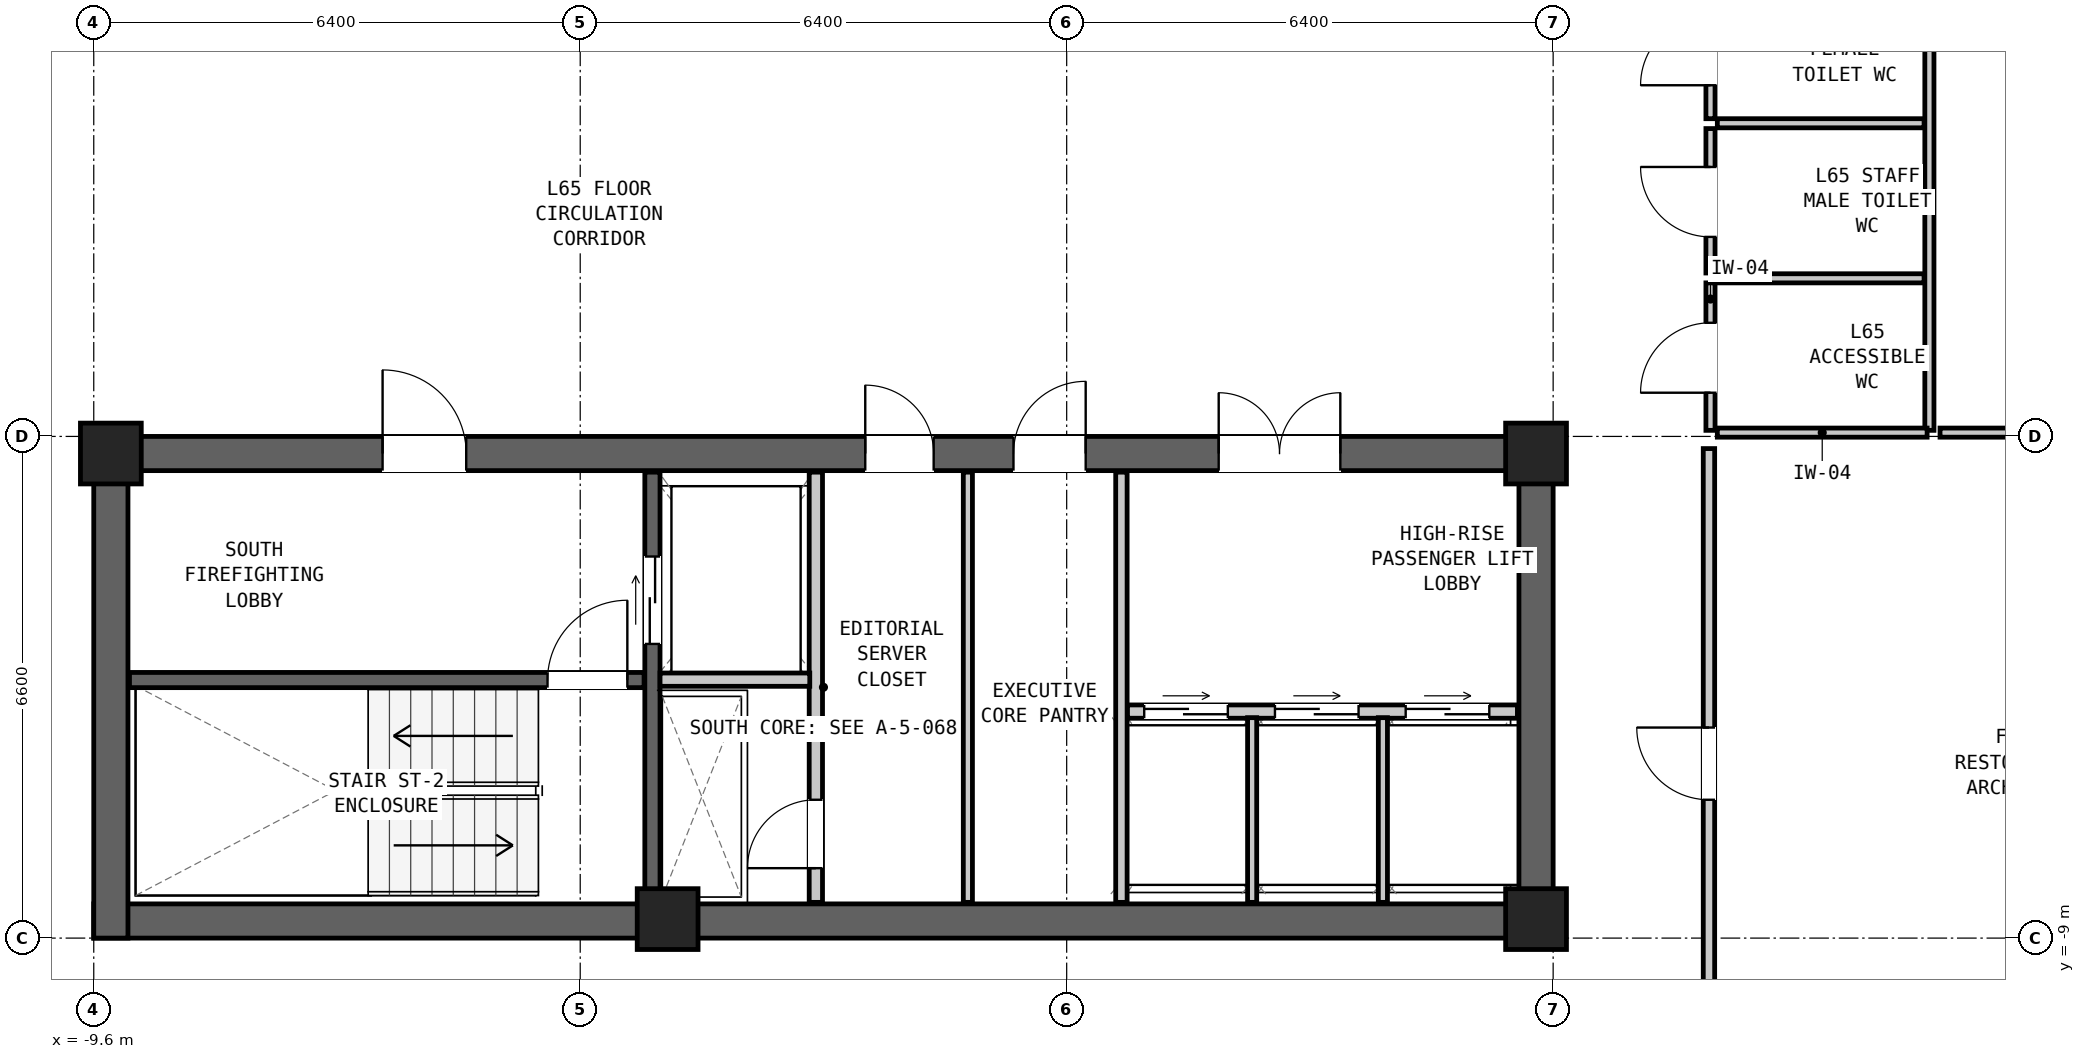
"""IFC4 building model, lengths in metres.
Left out: names, types, materials, properties, quantities, classifications, styles, units other than length and angle.
Written with IfcOpenShell. Run it as: python <this file> out.ifc"""

import sys

from ifc_helpers import new_model, si_unit, direction, frame, frame_2d, origin, origin_2d, place, context, subcontext, project, spatial, rectangle, extrude, element, fill, save


model = new_model("IFC4")
c1 = context("Model", 3, precision=1e-05, world=origin(), true_north=direction((0.0, 1.0)))
c2 = subcontext(c1, "Body", "Model", "MODEL_VIEW")
j1 = project(units=[si_unit("LENGTHUNIT", "METRE"), si_unit("PLANEANGLEUNIT", "RADIAN")], contexts=[c1])
p1 = place(None, origin())
s1 = spatial("IfcSite", under=j1, at=p1, CompositionType="ELEMENT")
p2 = place(p1, origin())
s2 = spatial("IfcBuilding", under=s1, at=p2, CompositionType="ELEMENT")
p3 = place(p2, frame((0.0, 0.0, 220.85)))
s3 = spatial("IfcBuildingStorey", under=s2, at=p3, CompositionType="ELEMENT", Elevation=220.85)
p4 = place(p3, frame((-9.6, -8.775, 0.0), z_axis=(0.0, 0.0, 1.0), x_axis=(1.0, 0.0, 0.0)))
e1 = element("IfcWall", 1, at=p4, inside=s3, PredefinedType="SHEAR", context=c2, shape_type="SweptSolid", body=[
    extrude(rectangle(XDim=19.2, YDim=0.45, at=frame_2d((9.6, 0.0))), origin(), (0.0, 0.0, 1.0), 3.05),
])
p5 = place(p3, frame((-9.6, -2.625, 0.0), z_axis=(0.0, 0.0, 1.0), x_axis=(1.0, 0.0, 0.0)))
e2 = element("IfcWall", 2, at=p5, inside=s3, PredefinedType="SHEAR", context=c2, shape_type="SweptSolid", body=[
    extrude(rectangle(XDim=19.2, YDim=0.45, at=frame_2d((9.6, 0.0))), origin(), (0.0, 0.0, 1.0), 3.05),
])
p6 = place(p5, frame((3.8, 0.0, 0.0)))
e3 = element("IfcOpeningElement", 3, at=p6, cuts=e2, PredefinedType="OPENING", context=c2, shape_type="SweptSolid", body=[
    extrude(rectangle(XDim=1.1, YDim=2.08, at=frame_2d((0.55, 1.04))), frame((0.0, 0.237, 0.0), z_axis=(0.0, -1.0, 0.0), x_axis=(1.0, 0.0, 0.0)), (0.0, 0.0, 1.0), 0.474),
])
p7 = place(p5, frame((10.15, 0.0, 0.0)))
e4 = element("IfcOpeningElement", 4, at=p7, cuts=e2, PredefinedType="OPENING", context=c2, shape_type="SweptSolid", body=[
    extrude(rectangle(XDim=0.9, YDim=2.05, at=frame_2d((0.45, 1.025))), frame((0.0, 0.237, 0.0), z_axis=(0.0, -1.0, 0.0), x_axis=(1.0, 0.0, 0.0)), (0.0, 0.0, 1.0), 0.474),
])
p8 = place(p5, frame((12.1, 0.0, 0.0)))
e5 = element("IfcOpeningElement", 5, at=p8, cuts=e2, PredefinedType="OPENING", context=c2, shape_type="SweptSolid", body=[
    extrude(rectangle(XDim=0.95, YDim=2.1, at=frame_2d((0.475, 1.05))), frame((0.0, 0.237, 0.0), z_axis=(0.0, -1.0, 0.0), x_axis=(1.0, 0.0, 0.0)), (0.0, 0.0, 1.0), 0.474),
])
p9 = place(p5, frame((14.8, 0.0, 0.0)))
e6 = element("IfcOpeningElement", 6, at=p9, cuts=e2, PredefinedType="OPENING", context=c2, shape_type="SweptSolid", body=[
    extrude(rectangle(XDim=1.6, YDim=2.12, at=frame_2d((0.8, 1.06))), frame((0.0, 0.237, 0.0), z_axis=(0.0, -1.0, 0.0), x_axis=(1.0, 0.0, 0.0)), (0.0, 0.0, 1.0), 0.474),
])
for number, where, z_axis, x_axis in (
    (7, (-9.375, -9.0, 0.0), (0.0, 0.0, 1.0), (0.0, 1.0, 0.0)),
    (8, (9.375, -9.0, 0.0), (0.0, 0.0, 1.0), (0.0, 1.0, 0.0)),
):
    element("IfcWall", number, at=place(p3, frame(where, z_axis=z_axis, x_axis=x_axis)), inside=s3, PredefinedType="SHEAR", context=c2, shape_type="SweptSolid", body=[
        extrude(rectangle(XDim=6.6, YDim=0.45, at=frame_2d((3.3, 0.0))), origin(), (0.0, 0.0, 1.0), 3.05),
    ])
for number, where, z_axis, x_axis in (
    (9, (-9.375, -2.625, 0.0), (0.0, 0.0, 1.0), (1.0, 0.0, 0.0)),
    (10, (9.375, -2.625, 0.0), (0.0, 0.0, 1.0), (1.0, 0.0, 0.0)),
    (11, (-2.05, -8.75, 0.0), (0.0, 0.0, 1.0), (1.0, 0.0, 0.0)),
    (12, (9.375, -8.75, 0.0), (0.0, 0.0, 1.0), (1.0, 0.0, 0.0)),
):
    element("IfcColumn", number, at=place(p3, frame(where, z_axis=z_axis, x_axis=x_axis)), inside=s3, PredefinedType="COLUMN", context=c2, shape_type="SweptSolid", body=[
        extrude(rectangle(XDim=0.8, YDim=0.8, at=origin_2d()), origin(), (0.0, 0.0, 1.0), 3.05),
    ])
p10 = place(p3, frame((-9.13, -5.605, 0.0), z_axis=(0.0, 0.0, 1.0), x_axis=(1.0, 0.0, 0.0)))
e13 = element("IfcWall", 13, at=p10, inside=s3, PredefinedType="SHEAR", context=c2, shape_type="SweptSolid", body=[
    extrude(rectangle(XDim=6.77, YDim=0.2, at=frame_2d((3.385, 0.0))), origin(), (0.0, 0.0, 1.0), 2.86),
])
p11 = place(p10, frame((5.5, 0.0, 0.0)))
e14 = element("IfcOpeningElement", 14, at=p11, cuts=e13, PredefinedType="OPENING", context=c2, shape_type="SweptSolid", body=[
    extrude(rectangle(XDim=1.05, YDim=2.08, at=frame_2d((0.525, 1.04))), frame((0.0, 0.112, 0.0), z_axis=(0.0, -1.0, 0.0), x_axis=(1.0, 0.0, 0.0)), (0.0, 0.0, 1.0), 0.224),
])
p12 = place(p3, frame((-2.25, -8.53, 0.0), z_axis=(0.0, 0.0, 1.0), x_axis=(0.0, 1.0, 0.0)))
e15 = element("IfcWall", 15, at=p12, inside=s3, PredefinedType="SHEAR", context=c2, shape_type="SweptSolid", body=[
    extrude(rectangle(XDim=5.66, YDim=0.2, at=frame_2d((2.83, 0.0))), origin(), (0.0, 0.0, 1.0), 2.86),
])
p13 = place(p12, frame((3.4, 0.0, 0.0)))
e16 = element("IfcOpeningElement", 16, at=p13, cuts=e15, PredefinedType="OPENING", context=c2, shape_type="SweptSolid", body=[
    extrude(rectangle(XDim=1.15, YDim=2.08, at=frame_2d((0.575, 1.04))), frame((0.0, 0.112, 0.0), z_axis=(0.0, -1.0, 0.0), x_axis=(1.0, 0.0, 0.0)), (0.0, 0.0, 1.0), 0.224),
])
p14 = place(p3, frame((-0.1, -8.53, 0.0), z_axis=(0.0, 0.0, 1.0), x_axis=(0.0, 1.0, 0.0)))
e17 = element("IfcWall", 17, at=p14, inside=s3, PredefinedType="PARTITIONING", context=c2, shape_type="SweptSolid", body=[
    extrude(rectangle(XDim=5.66, YDim=0.175, at=frame_2d((2.83, 0.0))), origin(), (0.0, 0.0, 1.0), 2.86),
])
p15 = place(p14, frame((0.45, 0.0, 0.0)))
e18 = element("IfcOpeningElement", 18, at=p15, cuts=e17, PredefinedType="OPENING", context=c2, shape_type="SweptSolid", body=[
    extrude(rectangle(XDim=0.9, YDim=2.05, at=frame_2d((0.45, 1.025))), frame((0.0, 0.1, 0.0), z_axis=(0.0, -1.0, 0.0), x_axis=(1.0, 0.0, 0.0)), (0.0, 0.0, 1.0), 0.199),
])
p16 = place(p3, frame((-2.15, -5.6, 0.0), z_axis=(0.0, 0.0, 1.0), x_axis=(1.0, 0.0, 0.0)))
e19 = element("IfcWall", 19, at=p16, inside=s3, PredefinedType="PARTITIONING", context=c2, shape_type="SweptSolid", body=[
    extrude(rectangle(XDim=1.97, YDim=0.175, at=frame_2d((0.985, 0.0))), origin(), (0.0, 0.0, 1.0), 2.86),
])
p17 = place(p3, frame((3.92, -8.53, 0.0), z_axis=(0.0, 0.0, 1.0), x_axis=(0.0, 1.0, 0.0)))
e20 = element("IfcWall", 20, at=p17, inside=s3, PredefinedType="PARTITIONING", context=c2, shape_type="SweptSolid", body=[
    extrude(rectangle(XDim=5.66, YDim=0.15, at=frame_2d((2.83, 0.0))), origin(), (0.0, 0.0, 1.0), 2.86),
])
p18 = place(p3, frame((1.9, -8.53, 0.0), z_axis=(0.0, 0.0, 1.0), x_axis=(0.0, 1.0, 0.0)))
e21 = element("IfcWall", 21, at=p18, inside=s3, PredefinedType="PARTITIONING", context=c2, shape_type="SweptSolid", body=[
    extrude(rectangle(XDim=5.66, YDim=0.12, at=frame_2d((2.83, 0.0))), origin(), (0.0, 0.0, 1.0), 2.86),
])
p19 = place(p3, frame((4.0, -6.02, 0.0), z_axis=(0.0, 0.0, 1.0), x_axis=(1.0, 0.0, 0.0)))
e22 = element("IfcWall", 22, at=p19, inside=s3, PredefinedType="PARTITIONING", context=c2, shape_type="SweptSolid", body=[
    extrude(rectangle(XDim=5.13, YDim=0.175, at=frame_2d((2.565, 0.0))), origin(), (0.0, 0.0, 1.0), 2.86),
])
p20 = place(p19, frame((0.22, 0.0, 0.0)))
e23 = element("IfcOpeningElement", 23, at=p20, cuts=e22, PredefinedType="OPENING", context=c2, shape_type="SweptSolid", body=[
    extrude(rectangle(XDim=1.1, YDim=2.06, at=frame_2d((0.55, 1.03))), frame((0.0, 0.1, 0.0), z_axis=(0.0, -1.0, 0.0), x_axis=(1.0, 0.0, 0.0)), (0.0, 0.0, 1.0), 0.199),
])
p21 = place(p19, frame((1.94, 0.0, 0.0)))
e24 = element("IfcOpeningElement", 24, at=p21, cuts=e22, PredefinedType="OPENING", context=c2, shape_type="SweptSolid", body=[
    extrude(rectangle(XDim=1.1, YDim=2.06, at=frame_2d((0.55, 1.03))), frame((0.0, 0.1, 0.0), z_axis=(0.0, -1.0, 0.0), x_axis=(1.0, 0.0, 0.0)), (0.0, 0.0, 1.0), 0.199),
])
p22 = place(p19, frame((3.66, 0.0, 0.0)))
e25 = element("IfcOpeningElement", 25, at=p22, cuts=e22, PredefinedType="OPENING", context=c2, shape_type="SweptSolid", body=[
    extrude(rectangle(XDim=1.1, YDim=2.06, at=frame_2d((0.55, 1.03))), frame((0.0, 0.1, 0.0), z_axis=(0.0, -1.0, 0.0), x_axis=(1.0, 0.0, 0.0)), (0.0, 0.0, 1.0), 0.199),
])
for number, where, z_axis, x_axis in (
    (26, (5.64, -8.53, 0.0), (0.0, 0.0, 1.0), (0.0, 1.0, 0.0)),
    (27, (7.36, -8.53, 0.0), (0.0, 0.0, 1.0), (0.0, 1.0, 0.0)),
):
    element("IfcWall", number, at=place(p3, frame(where, z_axis=z_axis, x_axis=x_axis)), inside=s3, PredefinedType="PARTITIONING", context=c2, shape_type="SweptSolid", body=[
        extrude(rectangle(XDim=2.43, YDim=0.12, at=frame_2d((1.215, 0.0))), origin(), (0.0, 0.0, 1.0), 2.86),
    ])
p23 = place(p3, frame((11.67, -2.32, 0.0), z_axis=(0.0, 0.0, 1.0), x_axis=(0.0, 1.0, 0.0)))
e28 = element("IfcWall", 28, at=p23, inside=s3, PredefinedType="PARTITIONING", context=c2, shape_type="SweptSolid", body=[
    extrude(rectangle(XDim=1.94, YDim=0.12, at=frame_2d((0.97, 0.0))), origin(), (0.0, 0.0, 1.0), 2.86),
])
p24 = place(p23, frame((0.495, 0.0, 0.0)))
e29 = element("IfcOpeningElement", 29, at=p24, cuts=e28, PredefinedType="OPENING", context=c2, shape_type="SweptSolid", body=[
    extrude(rectangle(XDim=0.92, YDim=2.1, at=frame_2d((0.46, 1.05))), frame((0.0, 0.072, 0.0), z_axis=(0.0, -1.0, 0.0), x_axis=(1.0, 0.0, 0.0)), (0.0, 0.0, 1.0), 0.144),
])
p25 = place(p3, frame((11.67, -0.25, 0.0), z_axis=(0.0, 0.0, 1.0), x_axis=(0.0, 1.0, 0.0)))
e30 = element("IfcWall", 30, at=p25, inside=s3, PredefinedType="PARTITIONING", context=c2, shape_type="SweptSolid", body=[
    extrude(rectangle(XDim=1.9, YDim=0.12, at=frame_2d((0.95, 0.0))), origin(), (0.0, 0.0, 1.0), 2.86),
])
p26 = place(p25, frame((0.475, 0.0, 0.0)))
e31 = element("IfcOpeningElement", 31, at=p26, cuts=e30, PredefinedType="OPENING", context=c2, shape_type="SweptSolid", body=[
    extrude(rectangle(XDim=0.92, YDim=2.1, at=frame_2d((0.46, 1.05))), frame((0.0, 0.072, 0.0), z_axis=(0.0, -1.0, 0.0), x_axis=(1.0, 0.0, 0.0)), (0.0, 0.0, 1.0), 0.144),
])
p27 = place(p3, frame((11.67, 1.78, 0.0), z_axis=(0.0, 0.0, 1.0), x_axis=(0.0, 1.0, 0.0)))
e32 = element("IfcWall", 32, at=p27, inside=s3, PredefinedType="PARTITIONING", context=c2, shape_type="SweptSolid", body=[
    extrude(rectangle(XDim=1.83, YDim=0.12, at=frame_2d((0.915, 0.0))), origin(), (0.0, 0.0, 1.0), 2.86),
])
p28 = place(p27, frame((0.44, 0.0, 0.0)))
e33 = element("IfcOpeningElement", 33, at=p28, cuts=e32, PredefinedType="OPENING", context=c2, shape_type="SweptSolid", body=[
    extrude(rectangle(XDim=0.92, YDim=2.1, at=frame_2d((0.46, 1.05))), frame((0.0, 0.072, 0.0), z_axis=(0.0, -1.0, 0.0), x_axis=(1.0, 0.0, 0.0)), (0.0, 0.0, 1.0), 0.144),
])
p29 = place(p3, frame((14.55, -2.32, 0.0), z_axis=(0.0, 0.0, 1.0), x_axis=(0.0, 1.0, 0.0)))
e34 = element("IfcWall", 34, at=p29, inside=s3, PredefinedType="PARTITIONING", context=c2, shape_type="SweptSolid", body=[
    extrude(rectangle(XDim=5.93, YDim=0.12, at=frame_2d((2.965, 0.0))), origin(), (0.0, 0.0, 1.0), 2.86),
])
p30 = place(p3, frame((11.76, -2.35, 0.0), z_axis=(0.0, 0.0, 1.0), x_axis=(1.0, 0.0, 0.0)))
e35 = element("IfcWall", 35, at=p30, inside=s3, PredefinedType="PARTITIONING", context=c2, shape_type="SweptSolid", body=[
    extrude(rectangle(XDim=2.76, YDim=0.12, at=frame_2d((1.38, 0.0))), origin(), (0.0, 0.0, 1.0), 1.981),
])
for number, where, z_axis, x_axis in (
    (36, (11.76, -0.32, 0.0), (0.0, 0.0, 1.0), (1.0, 0.0, 0.0)),
    (37, (11.76, 1.72, 0.0), (0.0, 0.0, 1.0), (1.0, 0.0, 0.0)),
):
    element("IfcWall", number, at=place(p3, frame(where, z_axis=z_axis, x_axis=x_axis)), inside=s3, PredefinedType="PARTITIONING", context=c2, shape_type="SweptSolid", body=[
        extrude(rectangle(XDim=2.72, YDim=0.12, at=frame_2d((1.36, 0.0))), origin(), (0.0, 0.0, 1.0), 2.86),
    ])
p31 = place(p3, frame((14.69, -2.35, 0.0), z_axis=(0.0, 0.0, 1.0), x_axis=(1.0, 0.0, 0.0)))
e38 = element("IfcWall", 38, at=p31, inside=s3, PredefinedType="PARTITIONING", context=c2, shape_type="SweptSolid", body=[
    extrude(rectangle(XDim=4.69, YDim=0.12, at=frame_2d((2.345, 0.0))), origin(), (0.0, 0.0, 1.0), 1.981),
])
p32 = place(p3, frame((11.65, -10.85, 0.0), z_axis=(0.0, 0.0, 1.0), x_axis=(0.0, 1.0, 0.0)))
e39 = element("IfcWall", 39, at=p32, inside=s3, PredefinedType="PARTITIONING", context=c2, shape_type="SweptSolid", body=[
    extrude(rectangle(XDim=8.29, YDim=0.15, at=frame_2d((4.145, 0.0))), origin(), (0.0, 0.0, 1.0), 2.86),
])
p33 = place(p32, frame((3.67, 0.0, 0.0)))
e40 = element("IfcOpeningElement", 40, at=p33, cuts=e39, PredefinedType="OPENING", context=c2, shape_type="SweptSolid", body=[
    extrude(rectangle(XDim=0.95, YDim=2.1, at=frame_2d((0.475, 1.05))), frame((0.0, 0.087, 0.0), z_axis=(0.0, -1.0, 0.0), x_axis=(1.0, 0.0, 0.0)), (0.0, 0.0, 1.0), 0.174),
])
p34 = place(p11, origin())
e41 = element("IfcDoor", 41, at=p34, inside=s3, OperationType="SINGLE_SWING_RIGHT", PredefinedType="DOOR", context=c2, shape_type="SweptSolid", body=[
    extrude(rectangle(XDim=1.05, YDim=2.08, at=frame_2d((0.525, 1.04))), frame((0.0, 0.025, 0.0), z_axis=(0.0, -1.0, 0.0), x_axis=(1.0, 0.0, 0.0)), (0.0, 0.0, 1.0), 0.05),
])
fill(e14, e41)
p35 = place(p6, origin())
e42 = element("IfcDoor", 42, at=p35, inside=s3, OperationType="SINGLE_SWING_LEFT", PredefinedType="DOOR", context=c2, shape_type="SweptSolid", body=[
    extrude(rectangle(XDim=1.1, YDim=2.08, at=frame_2d((0.55, 1.04))), frame((0.0, 0.025, 0.0), z_axis=(0.0, -1.0, 0.0), x_axis=(1.0, 0.0, 0.0)), (0.0, 0.0, 1.0), 0.05),
])
fill(e3, e42)
p36 = place(p13, origin())
e43 = element("IfcDoor", 43, at=p36, inside=s3, OperationType="DOUBLE_DOOR_SLIDING", PredefinedType="DOOR", context=c2, shape_type="SweptSolid", body=[
    extrude(rectangle(XDim=1.15, YDim=2.08, at=frame_2d((0.575, 1.04))), frame((0.0, 0.025, 0.0), z_axis=(0.0, -1.0, 0.0), x_axis=(1.0, 0.0, 0.0)), (0.0, 0.0, 1.0), 0.05),
])
fill(e16, e43)
p37 = place(p15, origin())
e44 = element("IfcDoor", 44, at=p37, inside=s3, OperationType="SINGLE_SWING_LEFT", PredefinedType="DOOR", context=c2, shape_type="SweptSolid", body=[
    extrude(rectangle(XDim=0.9, YDim=2.05, at=frame_2d((0.45, 1.025))), frame((0.0, 0.025, 0.0), z_axis=(0.0, -1.0, 0.0), x_axis=(1.0, 0.0, 0.0)), (0.0, 0.0, 1.0), 0.05),
])
fill(e18, e44)
p38 = place(p7, origin())
e45 = element("IfcDoor", 45, at=p38, inside=s3, OperationType="SINGLE_SWING_LEFT", PredefinedType="DOOR", context=c2, shape_type="SweptSolid", body=[
    extrude(rectangle(XDim=0.9, YDim=2.05, at=frame_2d((0.45, 1.025))), frame((0.0, 0.025, 0.0), z_axis=(0.0, -1.0, 0.0), x_axis=(1.0, 0.0, 0.0)), (0.0, 0.0, 1.0), 0.05),
])
fill(e4, e45)
p39 = place(p8, origin())
e46 = element("IfcDoor", 46, at=p39, inside=s3, OperationType="SINGLE_SWING_RIGHT", PredefinedType="DOOR", context=c2, shape_type="SweptSolid", body=[
    extrude(rectangle(XDim=0.95, YDim=2.1, at=frame_2d((0.475, 1.05))), frame((0.0, 0.025, 0.0), z_axis=(0.0, -1.0, 0.0), x_axis=(1.0, 0.0, 0.0)), (0.0, 0.0, 1.0), 0.05),
])
fill(e5, e46)
p40 = place(p20, origin())
e47 = element("IfcDoor", 47, at=p40, inside=s3, OperationType="DOUBLE_DOOR_SLIDING", PredefinedType="DOOR", context=c2, shape_type="SweptSolid", body=[
    extrude(rectangle(XDim=1.1, YDim=2.06, at=frame_2d((0.55, 1.03))), frame((0.0, 0.025, 0.0), z_axis=(0.0, -1.0, 0.0), x_axis=(1.0, 0.0, 0.0)), (0.0, 0.0, 1.0), 0.05),
])
fill(e23, e47)
p41 = place(p21, origin())
e48 = element("IfcDoor", 48, at=p41, inside=s3, OperationType="DOUBLE_DOOR_SLIDING", PredefinedType="DOOR", context=c2, shape_type="SweptSolid", body=[
    extrude(rectangle(XDim=1.1, YDim=2.06, at=frame_2d((0.55, 1.03))), frame((0.0, 0.025, 0.0), z_axis=(0.0, -1.0, 0.0), x_axis=(1.0, 0.0, 0.0)), (0.0, 0.0, 1.0), 0.05),
])
fill(e24, e48)
p42 = place(p22, origin())
e49 = element("IfcDoor", 49, at=p42, inside=s3, OperationType="DOUBLE_DOOR_SLIDING", PredefinedType="DOOR", context=c2, shape_type="SweptSolid", body=[
    extrude(rectangle(XDim=1.1, YDim=2.06, at=frame_2d((0.55, 1.03))), frame((0.0, 0.025, 0.0), z_axis=(0.0, -1.0, 0.0), x_axis=(1.0, 0.0, 0.0)), (0.0, 0.0, 1.0), 0.05),
])
fill(e25, e49)
p43 = place(p9, origin())
e50 = element("IfcDoor", 50, at=p43, inside=s3, OperationType="DOUBLE_DOOR_SINGLE_SWING", PredefinedType="DOOR", context=c2, shape_type="SweptSolid", body=[
    extrude(rectangle(XDim=1.6, YDim=2.12, at=frame_2d((0.8, 1.06))), frame((0.0, 0.025, 0.0), z_axis=(0.0, -1.0, 0.0), x_axis=(1.0, 0.0, 0.0)), (0.0, 0.0, 1.0), 0.05),
])
fill(e6, e50)
p44 = place(p24, origin())
e51 = element("IfcDoor", 51, at=p44, inside=s3, OperationType="SINGLE_SWING_LEFT", PredefinedType="DOOR", context=c2, shape_type="SweptSolid", body=[
    extrude(rectangle(XDim=0.92, YDim=2.1, at=frame_2d((0.46, 1.05))), frame((0.0, 0.025, 0.0), z_axis=(0.0, -1.0, 0.0), x_axis=(1.0, 0.0, 0.0)), (0.0, 0.0, 1.0), 0.05),
])
fill(e29, e51)
p45 = place(p26, origin())
e52 = element("IfcDoor", 52, at=p45, inside=s3, OperationType="SINGLE_SWING_RIGHT", PredefinedType="DOOR", context=c2, shape_type="SweptSolid", body=[
    extrude(rectangle(XDim=0.92, YDim=2.1, at=frame_2d((0.46, 1.05))), frame((0.0, 0.025, 0.0), z_axis=(0.0, -1.0, 0.0), x_axis=(1.0, 0.0, 0.0)), (0.0, 0.0, 1.0), 0.05),
])
fill(e31, e52)
p46 = place(p28, origin())
e53 = element("IfcDoor", 53, at=p46, inside=s3, OperationType="SINGLE_SWING_LEFT", PredefinedType="DOOR", context=c2, shape_type="SweptSolid", body=[
    extrude(rectangle(XDim=0.92, YDim=2.1, at=frame_2d((0.46, 1.05))), frame((0.0, 0.025, 0.0), z_axis=(0.0, -1.0, 0.0), x_axis=(1.0, 0.0, 0.0)), (0.0, 0.0, 1.0), 0.05),
])
fill(e33, e53)
p47 = place(p33, origin())
e54 = element("IfcDoor", 54, at=p47, inside=s3, OperationType="SINGLE_SWING_RIGHT", PredefinedType="DOOR", context=c2, shape_type="SweptSolid", body=[
    extrude(rectangle(XDim=0.95, YDim=2.1, at=frame_2d((0.475, 1.05))), frame((0.0, 0.025, 0.0), z_axis=(0.0, -1.0, 0.0), x_axis=(1.0, 0.0, 0.0)), (0.0, 0.0, 1.0), 0.05),
])
fill(e40, e54)
save(model, sys.argv[1])
